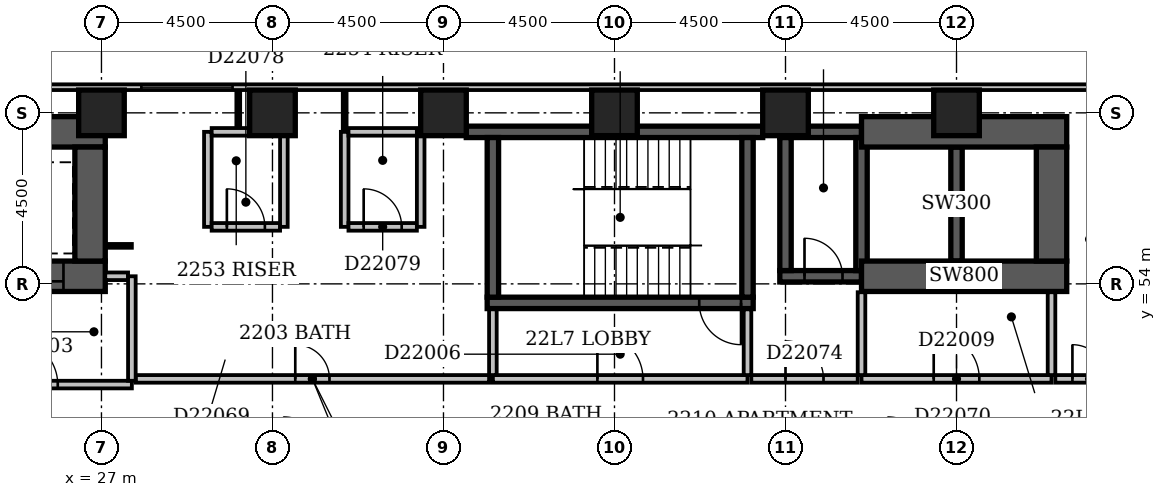
"""IFC4 building model, lengths in metres.
Left out: names, types, materials, properties, quantities, classifications, styles, units other than length and angle.
Written with IfcOpenShell. Run it as: python <this file> out.ifc"""

import sys

from ifc_helpers import new_model, si_unit, direction, frame, frame_2d, origin, origin_2d, place, context, subcontext, project, spatial, rectangle, extrude, element, fill, save


model = new_model("IFC4")
c1 = context("Model", 3, precision=1e-05, world=origin(), true_north=direction((0.0, 1.0)))
c2 = subcontext(c1, "Body", "Model", "MODEL_VIEW")
j1 = project(units=[si_unit("LENGTHUNIT", "METRE"), si_unit("PLANEANGLEUNIT", "RADIAN")], contexts=[c1])
p1 = place(None, origin())
s1 = spatial("IfcSite", under=j1, at=p1, CompositionType="ELEMENT")
p2 = place(p1, origin())
s2 = spatial("IfcBuilding", under=s1, at=p2, CompositionType="ELEMENT")
p3 = place(p2, frame((0.0, 0.0, 90.2)))
s3 = spatial("IfcBuildingStorey", under=s2, at=p3, CompositionType="ELEMENT", Elevation=90.2)
p4 = place(p3, frame((23.8, 54.2, -0.3), z_axis=(0.0, 0.0, 1.0), x_axis=(1.0, 0.0, 0.0)))
e1 = element("IfcWall", 1, at=p4, inside=s3, PredefinedType="SHEAR", context=c2, shape_type="SweptSolid", body=[
    extrude(rectangle(XDim=3.3, YDim=0.8, at=frame_2d((1.65, 0.0))), origin(), (0.0, 0.0, 1.0), 3.6),
])
p5 = place(p4, frame((1.1, 0.0, 0.3)))
e2 = element("IfcOpeningElement", 2, at=p5, cuts=e1, PredefinedType="OPENING", context=c2, shape_type="SweptSolid", body=[
    extrude(rectangle(XDim=1.1, YDim=2.1, at=frame_2d((0.55, 1.05))), frame((0.0, 0.412, 0.0), z_axis=(0.0, -1.0, 0.0), x_axis=(1.0, 0.0, 0.0)), (0.0, 0.0, 1.0), 0.824),
])
p6 = place(p3, frame((23.8, 58.0, -0.3), z_axis=(0.0, 0.0, 1.0), x_axis=(1.0, 0.0, 0.0)))
e3 = element("IfcWall", 3, at=p6, inside=s3, PredefinedType="SHEAR", context=c2, shape_type="SweptSolid", body=[
    extrude(rectangle(XDim=3.3, YDim=0.8, at=frame_2d((1.65, 0.0))), origin(), (0.0, 0.0, 1.0), 3.6),
])
p7 = place(p3, frame((26.7, 54.6, -0.3), z_axis=(0.0, 0.0, 1.0), x_axis=(0.0, 1.0, 0.0)))
e4 = element("IfcWall", 4, at=p7, inside=s3, PredefinedType="SHEAR", context=c2, shape_type="SweptSolid", body=[
    extrude(rectangle(XDim=3.0, YDim=0.8, at=frame_2d((1.5, 0.0))), origin(), (0.0, 0.0, 1.0), 3.6),
])
p8 = place(p3, frame((36.6, 58.0, -0.3), z_axis=(0.0, 0.0, 1.0), x_axis=(1.0, 0.0, 0.0)))
e5 = element("IfcWall", 5, at=p8, inside=s3, PredefinedType="SHEAR", context=c2, shape_type="SweptSolid", body=[
    extrude(rectangle(XDim=7.8, YDim=0.3, at=frame_2d((3.9, 0.0))), origin(), (0.0, 0.0, 1.0), 3.6),
])
p9 = place(p3, frame((37.15, 53.5, -0.3), z_axis=(0.0, 0.0, 1.0), x_axis=(1.0, 0.0, 0.0)))
e6 = element("IfcWall", 6, at=p9, inside=s3, PredefinedType="SHEAR", context=c2, shape_type="SweptSolid", body=[
    extrude(rectangle(XDim=7.0, YDim=0.3, at=frame_2d((3.5, 0.0))), origin(), (0.0, 0.0, 1.0), 3.6),
])
p10 = place(p9, frame((5.58, 0.0, 0.3)))
e7 = element("IfcOpeningElement", 7, at=p10, cuts=e6, PredefinedType="OPENING", context=c2, shape_type="SweptSolid", body=[
    extrude(rectangle(XDim=1.1, YDim=2.1, at=frame_2d((0.55, 1.05))), frame((0.0, 0.162, 0.0), z_axis=(0.0, -1.0, 0.0), x_axis=(1.0, 0.0, 0.0)), (0.0, 0.0, 1.0), 0.324),
])
for number, where, z_axis, x_axis in (
    (8, (37.3, 53.65, -0.3), (0.0, 0.0, 1.0), (0.0, 1.0, 0.0)),
    (9, (44.0, 53.65, -0.3), (0.0, 0.0, 1.0), (0.0, 1.0, 0.0)),
):
    element("IfcWall", number, at=place(p3, frame(where, z_axis=z_axis, x_axis=x_axis)), inside=s3, PredefinedType="SHEAR", context=c2, shape_type="SweptSolid", body=[
        extrude(rectangle(XDim=4.2, YDim=0.3, at=frame_2d((2.1, 0.0))), origin(), (0.0, 0.0, 1.0), 3.6),
    ])
p11 = place(p3, frame((44.85, 54.2, -0.3), z_axis=(0.0, 0.0, 1.0), x_axis=(1.0, 0.0, 0.0)))
e10 = element("IfcWall", 10, at=p11, inside=s3, PredefinedType="SHEAR", context=c2, shape_type="SweptSolid", body=[
    extrude(rectangle(XDim=2.15, YDim=0.3, at=frame_2d((1.075, 0.0))), origin(), (0.0, 0.0, 1.0), 3.6),
])
p12 = place(p11, frame((0.65, 0.0, 0.3)))
e11 = element("IfcOpeningElement", 11, at=p12, cuts=e10, PredefinedType="OPENING", context=c2, shape_type="SweptSolid", body=[
    extrude(rectangle(XDim=1.0, YDim=2.1, at=frame_2d((0.5, 1.05))), frame((0.0, 0.162, 0.0), z_axis=(0.0, -1.0, 0.0), x_axis=(1.0, 0.0, 0.0)), (0.0, 0.0, 1.0), 0.324),
])
p13 = place(p3, frame((44.85, 58.0, -0.3), z_axis=(0.0, 0.0, 1.0), x_axis=(1.0, 0.0, 0.0)))
e12 = element("IfcWall", 12, at=p13, inside=s3, PredefinedType="SHEAR", context=c2, shape_type="SweptSolid", body=[
    extrude(rectangle(XDim=2.15, YDim=0.3, at=frame_2d((1.075, 0.0))), origin(), (0.0, 0.0, 1.0), 3.6),
])
p14 = place(p3, frame((45.0, 54.35, -0.3), z_axis=(0.0, 0.0, 1.0), x_axis=(0.0, 1.0, 0.0)))
e13 = element("IfcWall", 13, at=p14, inside=s3, PredefinedType="SHEAR", context=c2, shape_type="SweptSolid", body=[
    extrude(rectangle(XDim=3.5, YDim=0.3, at=frame_2d((1.75, 0.0))), origin(), (0.0, 0.0, 1.0), 3.6),
])
p15 = place(p3, frame((47.0, 54.2, -0.3), z_axis=(0.0, 0.0, 1.0), x_axis=(1.0, 0.0, 0.0)))
e14 = element("IfcWall", 14, at=p15, inside=s3, PredefinedType="SHEAR", context=c2, shape_type="SweptSolid", body=[
    extrude(rectangle(XDim=5.4, YDim=0.8, at=frame_2d((2.7, 0.0))), origin(), (0.0, 0.0, 1.0), 3.6),
])
p16 = place(p3, frame((47.0, 54.35, -0.3), z_axis=(0.0, 0.0, 1.0), x_axis=(0.0, 1.0, 0.0)))
e15 = element("IfcWall", 15, at=p16, inside=s3, PredefinedType="SHEAR", context=c2, shape_type="SweptSolid", body=[
    extrude(rectangle(XDim=3.5, YDim=0.3, at=frame_2d((1.75, 0.0))), origin(), (0.0, 0.0, 1.0), 3.6),
])
p17 = place(p3, frame((47.0, 58.0, -0.3), z_axis=(0.0, 0.0, 1.0), x_axis=(1.0, 0.0, 0.0)))
e16 = element("IfcWall", 16, at=p17, inside=s3, PredefinedType="SHEAR", context=c2, shape_type="SweptSolid", body=[
    extrude(rectangle(XDim=5.4, YDim=0.8, at=frame_2d((2.7, 0.0))), origin(), (0.0, 0.0, 1.0), 3.6),
])
p18 = place(p3, frame((49.5, 54.6, -0.3), z_axis=(0.0, 0.0, 1.0), x_axis=(0.0, 1.0, 0.0)))
e17 = element("IfcWall", 17, at=p18, inside=s3, PredefinedType="SHEAR", context=c2, shape_type="SweptSolid", body=[
    extrude(rectangle(XDim=3.0, YDim=0.3, at=frame_2d((1.5, 0.0))), origin(), (0.0, 0.0, 1.0), 3.6),
])
p19 = place(p3, frame((52.0, 54.6, -0.3), z_axis=(0.0, 0.0, 1.0), x_axis=(0.0, 1.0, 0.0)))
e18 = element("IfcWall", 18, at=p19, inside=s3, PredefinedType="SHEAR", context=c2, shape_type="SweptSolid", body=[
    extrude(rectangle(XDim=3.0, YDim=0.8, at=frame_2d((1.5, 0.0))), origin(), (0.0, 0.0, 1.0), 3.6),
])
for number, where, z_axis, x_axis in (
    (19, (27.0, 58.5, -0.3), (0.0, 0.0, 1.0), (1.0, 0.0, 0.0)),
    (20, (31.5, 58.5, -0.3), (0.0, 0.0, 1.0), (1.0, 0.0, 0.0)),
    (21, (36.0, 58.5, -0.3), (0.0, 0.0, 1.0), (1.0, 0.0, 0.0)),
    (22, (40.5, 58.5, -0.3), (0.0, 0.0, 1.0), (1.0, 0.0, 0.0)),
    (23, (45.0, 58.5, -0.3), (0.0, 0.0, 1.0), (1.0, 0.0, 0.0)),
    (24, (49.5, 58.5, -0.3), (0.0, 0.0, 1.0), (1.0, 0.0, 0.0)),
):
    element("IfcColumn", number, at=place(p3, frame(where, z_axis=z_axis, x_axis=x_axis)), inside=s3, PredefinedType="COLUMN", context=c2, shape_type="SweptSolid", body=[
        extrude(rectangle(XDim=1.2, YDim=1.2, at=origin_2d()), origin(), (0.0, 0.0, 1.0), 3.6),
    ])
p20 = place(p3, frame((68.1, 59.175, 0.0), z_axis=(0.0, 0.0, 1.0), x_axis=(-1.0, 0.0, 0.0)))
e25 = element("IfcWall", 25, at=p20, inside=s3, PredefinedType="STANDARD", context=c2, shape_type="SweptSolid", body=[
    extrude(rectangle(XDim=68.85, YDim=0.15, at=frame_2d((34.425, 0.0))), origin(), (0.0, 0.0, 1.0), 2.7),
])
p21 = place(p20, frame((37.65, 0.0, 0.6)))
e26 = element("IfcOpeningElement", 26, at=p21, cuts=e25, PredefinedType="OPENING", context=c2, shape_type="SweptSolid", body=[
    extrude(rectangle(XDim=2.4, YDim=1.8, at=frame_2d((1.2, 0.9))), frame((0.0, 0.087, 0.0), z_axis=(0.0, -1.0, 0.0), x_axis=(1.0, 0.0, 0.0)), (0.0, 0.0, 1.0), 0.174),
])
p22 = place(p3, frame((47.0, 51.5, 0.0), z_axis=(0.0, 0.0, 1.0), x_axis=(1.0, 0.0, 0.0)))
e27 = element("IfcWall", 27, at=p22, inside=s3, PredefinedType="PARTITIONING", context=c2, shape_type="SweptSolid", body=[
    extrude(rectangle(XDim=5.0, YDim=0.2, at=frame_2d((2.5, 0.0))), origin(), (0.0, 0.0, 1.0), 3.3),
])
p23 = place(p22, frame((1.9, 0.0, 0.0)))
e28 = element("IfcOpeningElement", 28, at=p23, cuts=e27, PredefinedType="OPENING", context=c2, shape_type="SweptSolid", body=[
    extrude(rectangle(XDim=1.2, YDim=2.1, at=frame_2d((0.6, 1.05))), frame((0.0, 0.112, 0.0), z_axis=(0.0, -1.0, 0.0), x_axis=(1.0, 0.0, 0.0)), (0.0, 0.0, 1.0), 0.224),
])
for number, where, z_axis, x_axis in (
    (29, (52.0, 51.6, 0.0), (0.0, 0.0, 1.0), (0.0, 1.0, 0.0)),
    (30, (47.0, 51.6, 0.0), (0.0, 0.0, 1.0), (0.0, 1.0, 0.0)),
):
    element("IfcWall", number, at=place(p3, frame(where, z_axis=z_axis, x_axis=x_axis)), inside=s3, PredefinedType="PARTITIONING", context=c2, shape_type="SweptSolid", body=[
        extrude(rectangle(XDim=2.18, YDim=0.2, at=frame_2d((1.09, 0.0))), origin(), (0.0, 0.0, 1.0), 3.3),
    ])
p24 = place(p3, frame((23.0, 51.35, 0.0), z_axis=(0.0, 0.0, 1.0), x_axis=(1.0, 0.0, 0.0)))
e31 = element("IfcWall", 31, at=p24, inside=s3, PredefinedType="PARTITIONING", context=c2, shape_type="SweptSolid", body=[
    extrude(rectangle(XDim=4.8, YDim=0.2, at=frame_2d((2.4, 0.0))), origin(), (0.0, 0.0, 1.0), 3.3),
])
p25 = place(p24, frame((1.65, 0.0, 0.0)))
e32 = element("IfcOpeningElement", 32, at=p25, cuts=e31, PredefinedType="OPENING", context=c2, shape_type="SweptSolid", body=[
    extrude(rectangle(XDim=1.2, YDim=2.1, at=frame_2d((0.6, 1.05))), frame((0.0, 0.112, 0.0), z_axis=(0.0, -1.0, 0.0), x_axis=(1.0, 0.0, 0.0)), (0.0, 0.0, 1.0), 0.224),
])
p26 = place(p3, frame((27.8, 51.45, 0.0), z_axis=(0.0, 0.0, 1.0), x_axis=(0.0, 1.0, 0.0)))
e33 = element("IfcWall", 33, at=p26, inside=s3, PredefinedType="PARTITIONING", context=c2, shape_type="SweptSolid", body=[
    extrude(rectangle(XDim=2.75, YDim=0.2, at=frame_2d((1.375, 0.0))), origin(), (0.0, 0.0, 1.0), 3.3),
])
p27 = place(p3, frame((27.1, 54.2, 0.0), z_axis=(0.0, 0.0, 1.0), x_axis=(1.0, 0.0, 0.0)))
e34 = element("IfcWall", 34, at=p27, inside=s3, PredefinedType="PARTITIONING", context=c2, shape_type="SweptSolid", body=[
    extrude(rectangle(XDim=0.6, YDim=0.2, at=frame_2d((0.3, 0.0))), origin(), (0.0, 0.0, 1.0), 3.3),
])
p28 = place(p3, frame((37.3, 51.5, 0.0), z_axis=(0.0, 0.0, 1.0), x_axis=(1.0, 0.0, 0.0)))
e35 = element("IfcWall", 35, at=p28, inside=s3, PredefinedType="PARTITIONING", context=c2, shape_type="SweptSolid", body=[
    extrude(rectangle(XDim=6.7, YDim=0.2, at=frame_2d((3.35, 0.0))), origin(), (0.0, 0.0, 1.0), 3.3),
])
p29 = place(p28, frame((2.75, 0.0, 0.0)))
e36 = element("IfcOpeningElement", 36, at=p29, cuts=e35, PredefinedType="OPENING", context=c2, shape_type="SweptSolid", body=[
    extrude(rectangle(XDim=1.2, YDim=2.1, at=frame_2d((0.6, 1.05))), frame((0.0, 0.112, 0.0), z_axis=(0.0, -1.0, 0.0), x_axis=(1.0, 0.0, 0.0)), (0.0, 0.0, 1.0), 0.224),
])
for number, where, z_axis, x_axis in (
    (37, (44.0, 51.6, 0.0), (0.0, 0.0, 1.0), (0.0, 1.0, 0.0)),
    (38, (37.3, 51.6, 0.0), (0.0, 0.0, 1.0), (0.0, 1.0, 0.0)),
):
    element("IfcWall", number, at=place(p3, frame(where, z_axis=z_axis, x_axis=x_axis)), inside=s3, PredefinedType="PARTITIONING", context=c2, shape_type="SweptSolid", body=[
        extrude(rectangle(XDim=1.73, YDim=0.2, at=frame_2d((0.865, 0.0))), origin(), (0.0, 0.0, 1.0), 3.3),
    ])
p30 = place(p3, frame((27.9, 51.5, 0.0), z_axis=(0.0, 0.0, 1.0), x_axis=(1.0, 0.0, 0.0)))
e39 = element("IfcWall", 39, at=p30, inside=s3, PredefinedType="PARTITIONING", context=c2, shape_type="SweptSolid", body=[
    extrude(rectangle(XDim=9.3, YDim=0.2, at=frame_2d((4.65, 0.0))), origin(), (0.0, 0.0, 1.0), 3.3),
])
p31 = place(p30, frame((4.2, 0.0, 0.0)))
e40 = element("IfcOpeningElement", 40, at=p31, cuts=e39, PredefinedType="OPENING", context=c2, shape_type="SweptSolid", body=[
    extrude(rectangle(XDim=0.9, YDim=2.1, at=frame_2d((0.45, 1.05))), frame((0.0, 0.112, 0.0), z_axis=(0.0, -1.0, 0.0), x_axis=(1.0, 0.0, 0.0)), (0.0, 0.0, 1.0), 0.224),
])
p32 = place(p3, frame((44.1, 51.5, 0.0), z_axis=(0.0, 0.0, 1.0), x_axis=(1.0, 0.0, 0.0)))
e41 = element("IfcWall", 41, at=p32, inside=s3, PredefinedType="PARTITIONING", context=c2, shape_type="SweptSolid", body=[
    extrude(rectangle(XDim=2.8, YDim=0.2, at=frame_2d((1.4, 0.0))), origin(), (0.0, 0.0, 1.0), 3.3),
])
p33 = place(p32, frame((0.9, 0.0, 0.0)))
e42 = element("IfcOpeningElement", 42, at=p33, cuts=e41, PredefinedType="OPENING", context=c2, shape_type="SweptSolid", body=[
    extrude(rectangle(XDim=1.0, YDim=2.1, at=frame_2d((0.5, 1.05))), frame((0.0, 0.112, 0.0), z_axis=(0.0, -1.0, 0.0), x_axis=(1.0, 0.0, 0.0)), (0.0, 0.0, 1.0), 0.224),
])
p34 = place(p3, frame((52.1, 51.5, 0.0), z_axis=(0.0, 0.0, 1.0), x_axis=(1.0, 0.0, 0.0)))
e43 = element("IfcWall", 43, at=p34, inside=s3, PredefinedType="PARTITIONING", context=c2, shape_type="SweptSolid", body=[
    extrude(rectangle(XDim=1.8, YDim=0.2, at=frame_2d((0.9, 0.0))), origin(), (0.0, 0.0, 1.0), 3.3),
])
p35 = place(p34, frame((0.45, 0.0, 0.0)))
e44 = element("IfcOpeningElement", 44, at=p35, cuts=e43, PredefinedType="OPENING", context=c2, shape_type="SweptSolid", body=[
    extrude(rectangle(XDim=0.9, YDim=2.1, at=frame_2d((0.45, 1.05))), frame((0.0, 0.112, 0.0), z_axis=(0.0, -1.0, 0.0), x_axis=(1.0, 0.0, 0.0)), (0.0, 0.0, 1.0), 0.224),
])
p36 = place(p3, frame((27.1, 55.0, 0.0), z_axis=(0.0, 0.0, 1.0), x_axis=(1.0, 0.0, 0.0)))
e45 = element("IfcWall", 45, at=p36, inside=s3, PredefinedType="PARTITIONING", context=c2, shape_type="SweptSolid", body=[
    extrude(rectangle(XDim=0.7, YDim=0.1, at=frame_2d((0.35, 0.0))), origin(), (0.0, 0.0, 1.0), 3.3),
])
p37 = place(p3, frame((29.8, 55.5, 0.0), z_axis=(0.0, 0.0, 1.0), x_axis=(0.0, 1.0, 0.0)))
e46 = element("IfcWall", 46, at=p37, inside=s3, PredefinedType="PARTITIONING", context=c2, shape_type="SweptSolid", body=[
    extrude(rectangle(XDim=2.5, YDim=0.2, at=frame_2d((1.25, 0.0))), origin(), (0.0, 0.0, 1.0), 3.3),
])
p38 = place(p3, frame((29.9, 55.5, 0.0), z_axis=(0.0, 0.0, 1.0), x_axis=(1.0, 0.0, 0.0)))
e47 = element("IfcWall", 47, at=p38, inside=s3, PredefinedType="PARTITIONING", context=c2, shape_type="SweptSolid", body=[
    extrude(rectangle(XDim=1.8, YDim=0.2, at=frame_2d((0.9, 0.0))), origin(), (0.0, 0.0, 1.0), 3.3),
])
p39 = place(p38, frame((0.4, 0.0, 0.0)))
e48 = element("IfcOpeningElement", 48, at=p39, cuts=e47, PredefinedType="OPENING", context=c2, shape_type="SweptSolid", body=[
    extrude(rectangle(XDim=1.0, YDim=2.1, at=frame_2d((0.5, 1.05))), frame((0.0, 0.112, 0.0), z_axis=(0.0, -1.0, 0.0), x_axis=(1.0, 0.0, 0.0)), (0.0, 0.0, 1.0), 0.224),
])
for number, where, z_axis, x_axis in (
    (49, (31.8, 55.5, 0.0), (0.0, 0.0, 1.0), (0.0, 1.0, 0.0)),
    (50, (33.4, 55.5, 0.0), (0.0, 0.0, 1.0), (0.0, 1.0, 0.0)),
):
    element("IfcWall", number, at=place(p3, frame(where, z_axis=z_axis, x_axis=x_axis)), inside=s3, PredefinedType="PARTITIONING", context=c2, shape_type="SweptSolid", body=[
        extrude(rectangle(XDim=2.5, YDim=0.2, at=frame_2d((1.25, 0.0))), origin(), (0.0, 0.0, 1.0), 3.3),
    ])
p40 = place(p3, frame((33.5, 55.5, 0.0), z_axis=(0.0, 0.0, 1.0), x_axis=(1.0, 0.0, 0.0)))
e51 = element("IfcWall", 51, at=p40, inside=s3, PredefinedType="PARTITIONING", context=c2, shape_type="SweptSolid", body=[
    extrude(rectangle(XDim=1.8, YDim=0.2, at=frame_2d((0.9, 0.0))), origin(), (0.0, 0.0, 1.0), 3.3),
])
p41 = place(p40, frame((0.4, 0.0, 0.0)))
e52 = element("IfcOpeningElement", 52, at=p41, cuts=e51, PredefinedType="OPENING", context=c2, shape_type="SweptSolid", body=[
    extrude(rectangle(XDim=1.0, YDim=2.1, at=frame_2d((0.5, 1.05))), frame((0.0, 0.112, 0.0), z_axis=(0.0, -1.0, 0.0), x_axis=(1.0, 0.0, 0.0)), (0.0, 0.0, 1.0), 0.224),
])
p42 = place(p3, frame((35.4, 55.5, 0.0), z_axis=(0.0, 0.0, 1.0), x_axis=(0.0, 1.0, 0.0)))
e53 = element("IfcWall", 53, at=p42, inside=s3, PredefinedType="PARTITIONING", context=c2, shape_type="SweptSolid", body=[
    extrude(rectangle(XDim=2.5, YDim=0.2, at=frame_2d((1.25, 0.0))), origin(), (0.0, 0.0, 1.0), 2.4),
])
p43 = place(p3, frame((29.9, 58.0, 0.0), z_axis=(0.0, 0.0, 1.0), x_axis=(1.0, 0.0, 0.0)))
e54 = element("IfcWall", 54, at=p43, inside=s3, PredefinedType="PARTITIONING", context=c2, shape_type="SweptSolid", body=[
    extrude(rectangle(XDim=1.8, YDim=0.2, at=frame_2d((0.9, 0.0))), origin(), (0.0, 0.0, 1.0), 3.3),
])
p44 = place(p3, frame((33.4, 58.0, 0.0), z_axis=(0.0, 0.0, 1.0), x_axis=(0.0, 1.0, 0.0)))
e55 = element("IfcWall", 55, at=p44, inside=s3, PredefinedType="PARTITIONING", context=c2, shape_type="SweptSolid", body=[
    extrude(rectangle(XDim=1.1, YDim=0.1, at=frame_2d((0.55, 0.0))), origin(), (0.0, 0.0, 1.0), 3.3),
])
p45 = place(p3, frame((33.5, 58.0, 0.0), z_axis=(0.0, 0.0, 1.0), x_axis=(1.0, 0.0, 0.0)))
e56 = element("IfcWall", 56, at=p45, inside=s3, PredefinedType="PARTITIONING", context=c2, shape_type="SweptSolid", body=[
    extrude(rectangle(XDim=1.8, YDim=0.2, at=frame_2d((0.9, 0.0))), origin(), (0.0, 0.0, 1.0), 3.3),
])
p46 = place(p3, frame((30.6, 58.1, 0.0), z_axis=(0.0, 0.0, 1.0), x_axis=(0.0, 1.0, 0.0)))
e57 = element("IfcWall", 57, at=p46, inside=s3, PredefinedType="PARTITIONING", context=c2, shape_type="SweptSolid", body=[
    extrude(rectangle(XDim=1.0, YDim=0.1, at=frame_2d((0.5, 0.0))), origin(), (0.0, 0.0, 1.0), 3.3),
])
p47 = place(p21, origin())
e58 = element("IfcWindow", 58, at=p47, inside=s3, PartitioningType="SINGLE_PANEL", PredefinedType="WINDOW", context=c2, shape_type="SweptSolid", body=[
    extrude(rectangle(XDim=2.4, YDim=1.8, at=frame_2d((1.2, 0.9))), frame((0.0, 0.03, 0.0), z_axis=(0.0, -1.0, 0.0), x_axis=(1.0, 0.0, 0.0)), (0.0, 0.0, 1.0), 0.06),
])
fill(e26, e58)
p48 = place(p25, origin())
e59 = element("IfcDoor", 59, at=p48, inside=s3, OperationType="SINGLE_SWING_LEFT", PredefinedType="DOOR", context=c2, shape_type="SweptSolid", body=[
    extrude(rectangle(XDim=1.2, YDim=2.1, at=frame_2d((0.6, 1.05))), frame((0.0, 0.025, 0.0), z_axis=(0.0, -1.0, 0.0), x_axis=(1.0, 0.0, 0.0)), (0.0, 0.0, 1.0), 0.05),
])
fill(e32, e59)
p49 = place(p5, origin())
e60 = element("IfcDoor", 60, at=p49, inside=s3, OperationType="SLIDING_TO_LEFT", PredefinedType="DOOR", context=c2, shape_type="SweptSolid", body=[
    extrude(rectangle(XDim=1.1, YDim=2.1, at=frame_2d((0.55, 1.05))), frame((0.0, 0.025, 0.0), z_axis=(0.0, -1.0, 0.0), x_axis=(1.0, 0.0, 0.0)), (0.0, 0.0, 1.0), 0.05),
])
fill(e2, e60)
p50 = place(p29, origin())
e61 = element("IfcDoor", 61, at=p50, inside=s3, OperationType="SINGLE_SWING_LEFT", PredefinedType="DOOR", context=c2, shape_type="SweptSolid", body=[
    extrude(rectangle(XDim=1.2, YDim=2.1, at=frame_2d((0.6, 1.05))), frame((0.0, 0.025, 0.0), z_axis=(0.0, -1.0, 0.0), x_axis=(1.0, 0.0, 0.0)), (0.0, 0.0, 1.0), 0.05),
])
fill(e36, e61)
p51 = place(p23, origin())
e62 = element("IfcDoor", 62, at=p51, inside=s3, OperationType="SINGLE_SWING_LEFT", PredefinedType="DOOR", context=c2, shape_type="SweptSolid", body=[
    extrude(rectangle(XDim=1.2, YDim=2.1, at=frame_2d((0.6, 1.05))), frame((0.0, 0.025, 0.0), z_axis=(0.0, -1.0, 0.0), x_axis=(1.0, 0.0, 0.0)), (0.0, 0.0, 1.0), 0.05),
])
fill(e28, e62)
p52 = place(p12, origin())
e63 = element("IfcDoor", 63, at=p52, inside=s3, OperationType="SINGLE_SWING_LEFT", PredefinedType="DOOR", context=c2, shape_type="SweptSolid", body=[
    extrude(rectangle(XDim=1.0, YDim=2.1, at=frame_2d((0.5, 1.05))), frame((0.0, 0.025, 0.0), z_axis=(0.0, -1.0, 0.0), x_axis=(1.0, 0.0, 0.0)), (0.0, 0.0, 1.0), 0.05),
])
fill(e11, e63)
p53 = place(p10, origin())
e64 = element("IfcDoor", 64, at=p53, inside=s3, OperationType="SINGLE_SWING_RIGHT", PredefinedType="DOOR", context=c2, shape_type="SweptSolid", body=[
    extrude(rectangle(XDim=1.1, YDim=2.1, at=frame_2d((0.55, 1.05))), frame((0.0, 0.025, 0.0), z_axis=(0.0, -1.0, 0.0), x_axis=(1.0, 0.0, 0.0)), (0.0, 0.0, 1.0), 0.05),
])
fill(e7, e64)
p54 = place(p31, origin())
e65 = element("IfcDoor", 65, at=p54, inside=s3, OperationType="SINGLE_SWING_LEFT", PredefinedType="DOOR", context=c2, shape_type="SweptSolid", body=[
    extrude(rectangle(XDim=0.9, YDim=2.1, at=frame_2d((0.45, 1.05))), frame((0.0, 0.025, 0.0), z_axis=(0.0, -1.0, 0.0), x_axis=(1.0, 0.0, 0.0)), (0.0, 0.0, 1.0), 0.05),
])
fill(e40, e65)
p55 = place(p33, origin())
e66 = element("IfcDoor", 66, at=p55, inside=s3, OperationType="SINGLE_SWING_LEFT", PredefinedType="DOOR", context=c2, shape_type="SweptSolid", body=[
    extrude(rectangle(XDim=1.0, YDim=2.1, at=frame_2d((0.5, 1.05))), frame((0.0, 0.025, 0.0), z_axis=(0.0, -1.0, 0.0), x_axis=(1.0, 0.0, 0.0)), (0.0, 0.0, 1.0), 0.05),
])
fill(e42, e66)
p56 = place(p35, origin())
e67 = element("IfcDoor", 67, at=p56, inside=s3, OperationType="SINGLE_SWING_LEFT", PredefinedType="DOOR", context=c2, shape_type="SweptSolid", body=[
    extrude(rectangle(XDim=0.9, YDim=2.1, at=frame_2d((0.45, 1.05))), frame((0.0, 0.025, 0.0), z_axis=(0.0, -1.0, 0.0), x_axis=(1.0, 0.0, 0.0)), (0.0, 0.0, 1.0), 0.05),
])
fill(e44, e67)
p57 = place(p39, origin())
e68 = element("IfcDoor", 68, at=p57, inside=s3, OperationType="SINGLE_SWING_LEFT", PredefinedType="DOOR", context=c2, shape_type="SweptSolid", body=[
    extrude(rectangle(XDim=1.0, YDim=2.1, at=frame_2d((0.5, 1.05))), frame((0.0, 0.025, 0.0), z_axis=(0.0, -1.0, 0.0), x_axis=(1.0, 0.0, 0.0)), (0.0, 0.0, 1.0), 0.05),
])
fill(e48, e68)
p58 = place(p41, origin())
e69 = element("IfcDoor", 69, at=p58, inside=s3, OperationType="SINGLE_SWING_LEFT", PredefinedType="DOOR", context=c2, shape_type="SweptSolid", body=[
    extrude(rectangle(XDim=1.0, YDim=2.1, at=frame_2d((0.5, 1.05))), frame((0.0, 0.025, 0.0), z_axis=(0.0, -1.0, 0.0), x_axis=(1.0, 0.0, 0.0)), (0.0, 0.0, 1.0), 0.05),
])
fill(e52, e69)
save(model, sys.argv[1])
